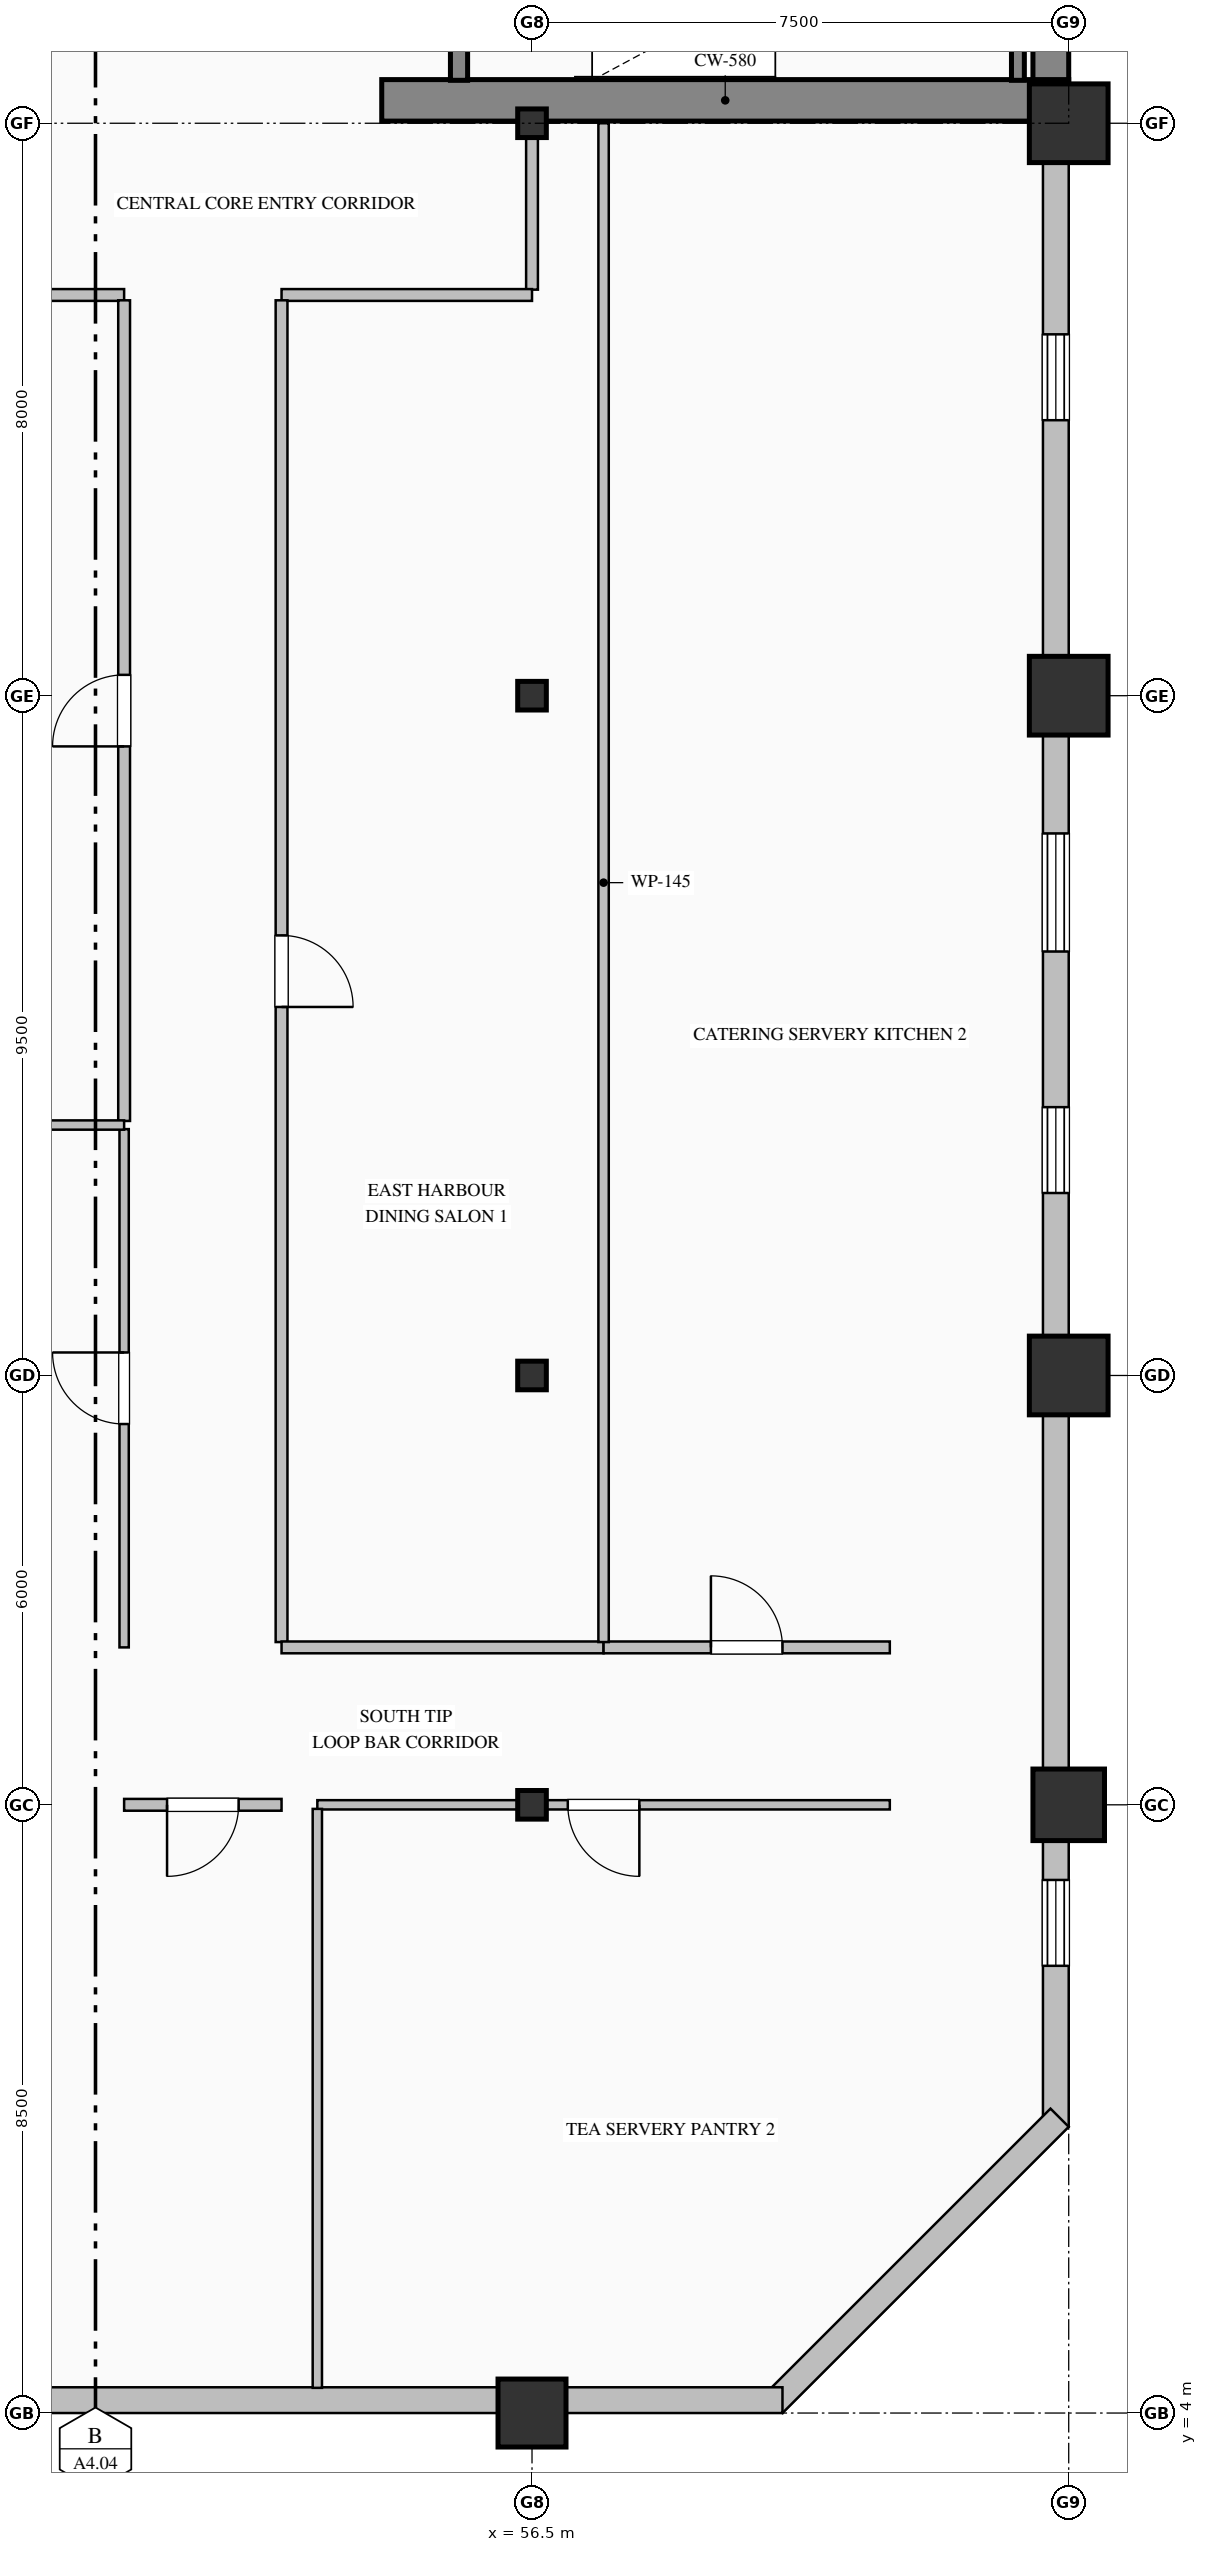
"""IFC4 building model, lengths in metres.
Left out: names, types, materials, properties, quantities, classifications, styles, units other than length and angle.
Written with IfcOpenShell. Run it as: python <this file> out.ifc"""

import sys

from ifc_helpers import new_model, si_unit, direction, frame, frame_2d, origin, origin_2d, place, context, subcontext, project, spatial, rectangle, hollow_rectangle, hollow_circle, i_section, extrude, element, fill, save


model = new_model("IFC4")
c1 = context("Model", 3, precision=1e-05, world=origin(), true_north=direction((0.0, 1.0)))
c2 = subcontext(c1, "Body", "Model", "MODEL_VIEW")
j1 = project(units=[si_unit("LENGTHUNIT", "METRE"), si_unit("PLANEANGLEUNIT", "RADIAN")], contexts=[c1])
p1 = place(None, origin())
s1 = spatial("IfcSite", under=j1, at=p1, CompositionType="ELEMENT")
p2 = place(p1, origin())
s2 = spatial("IfcBuilding", under=s1, at=p2, CompositionType="ELEMENT")
p3 = place(p2, frame((0.0, 0.0, 159.0)))
s3 = spatial("IfcBuildingStorey", under=s2, at=p3, CompositionType="ELEMENT", Elevation=159.0)
p4 = place(p3, frame((63.75, 36.32, 0.0), z_axis=(0.0, 0.0, 1.0), x_axis=(0.0, 1.0, 0.0)))
e1 = element("IfcWall", 1, at=p4, inside=s3, PredefinedType="SHEAR", context=c2, shape_type="SweptSolid", body=[
    extrude(rectangle(XDim=15.18, YDim=0.5, at=frame_2d((7.59, 0.0))), origin(), (0.0, 0.0, 1.0), 3.765),
])
p5 = place(p3, frame((54.4, 36.32, 0.0), z_axis=(0.0, 0.0, 1.0), x_axis=(1.0, 0.0, 0.0)))
e2 = element("IfcWall", 2, at=p5, inside=s3, PredefinedType="SHEAR", context=c2, shape_type="SweptSolid", body=[
    extrude(rectangle(XDim=9.6, YDim=0.58, at=frame_2d((4.8, 0.0))), origin(), (0.0, 0.0, 1.0), 4.0),
])
p6 = place(p3, frame((56.5, 4.0, 0.0), z_axis=(0.0, 0.0, 1.0), x_axis=(1.0, 0.0, 0.0)))
e3 = element("IfcColumn", 3, at=p6, inside=s3, PredefinedType="COLUMN", context=c2, shape_type="SweptSolid", body=[
    extrude(hollow_rectangle(XDim=0.95, YDim=0.95, WallThickness=0.036, at=origin_2d()), origin(), (0.0, 0.0, 1.0), 4.0),
])
for number, where, z_axis, x_axis in (
    (4, (56.5, 12.5, 0.0), (0.0, 0.0, 1.0), (1.0, 0.0, 0.0)),
    (5, (56.5, 18.5, 0.0), (0.0, 0.0, 1.0), (1.0, 0.0, 0.0)),
    (6, (56.5, 28.0, 0.0), (0.0, 0.0, 1.0), (1.0, 0.0, 0.0)),
    (7, (56.5, 36.0, 0.0), (0.0, 0.0, 1.0), (1.0, 0.0, 0.0)),
):
    element("IfcColumn", number, at=place(p3, frame(where, z_axis=z_axis, x_axis=x_axis)), inside=s3, PredefinedType="COLUMN", context=c2, shape_type="SweptSolid", body=[
        extrude(i_section(OverallWidth=0.4, OverallDepth=0.4, WebThickness=0.013, FlangeThickness=0.021, FilletRadius=0.022, at=origin_2d()), origin(), (0.0, 0.0, 1.0), 4.0),
    ])
p7 = place(p3, frame((64.0, 12.5, 0.0), z_axis=(0.0, 0.0, 1.0), x_axis=(1.0, 0.0, 0.0)))
e8 = element("IfcColumn", 8, at=p7, inside=s3, PredefinedType="COLUMN", context=c2, shape_type="SweptSolid", body=[
    extrude(hollow_circle(Radius=0.5, WallThickness=0.036, at=origin_2d()), origin(), (0.0, 0.0, 1.0), 4.0),
])
for number, where, z_axis, x_axis in (
    (9, (64.0, 18.5, 0.0), (0.0, 0.0, 1.0), (1.0, 0.0, 0.0)),
    (10, (64.0, 28.0, 0.0), (0.0, 0.0, 1.0), (1.0, 0.0, 0.0)),
    (11, (64.0, 36.0, 0.0), (0.0, 0.0, 1.0), (1.0, 0.0, 0.0)),
):
    element("IfcColumn", number, at=place(p3, frame(where, z_axis=z_axis, x_axis=x_axis)), inside=s3, PredefinedType="COLUMN", context=c2, shape_type="SweptSolid", body=[
        extrude(hollow_rectangle(XDim=1.1, YDim=1.1, WallThickness=0.04, at=origin_2d()), origin(), (0.0, 0.0, 1.0), 4.0),
    ])
p8 = place(p3, frame((63.82, 36.05, 0.0), z_axis=(0.0, 0.0, 1.0), x_axis=(0.0, -1.0, 0.0)))
e12 = element("IfcWall", 12, at=p8, inside=s3, PredefinedType="SOLIDWALL", context=c2, shape_type="SweptSolid", body=[
    extrude(rectangle(XDim=28.05, YDim=0.36, at=frame_2d((14.025, 0.0))), origin(), (0.0, 0.0, 1.0), 3.265),
])
p9 = place(p8, frame((3.0, 0.0, 0.7)))
e13 = element("IfcOpeningElement", 13, at=p9, cuts=e12, PredefinedType="OPENING", context=c2, shape_type="SweptSolid", body=[
    extrude(rectangle(XDim=1.2, YDim=1.85, at=frame_2d((0.6, 0.925))), frame((0.0, 0.19, 0.0), z_axis=(0.0, -1.0, 0.0), x_axis=(1.0, 0.0, 0.0)), (0.0, 0.0, 1.0), 0.38),
])
p10 = place(p8, frame((9.975, 0.0, 0.85)))
e14 = element("IfcOpeningElement", 14, at=p10, cuts=e12, PredefinedType="OPENING", context=c2, shape_type="SweptSolid", body=[
    extrude(rectangle(XDim=1.65, YDim=1.95, at=frame_2d((0.825, 0.975))), frame((0.0, 0.19, 0.0), z_axis=(0.0, -1.0, 0.0), x_axis=(1.0, 0.0, 0.0)), (0.0, 0.0, 1.0), 0.38),
])
p11 = place(p8, frame((13.8, 0.0, 0.7)))
e15 = element("IfcOpeningElement", 15, at=p11, cuts=e12, PredefinedType="OPENING", context=c2, shape_type="SweptSolid", body=[
    extrude(rectangle(XDim=1.2, YDim=1.85, at=frame_2d((0.6, 0.925))), frame((0.0, 0.19, 0.0), z_axis=(0.0, -1.0, 0.0), x_axis=(1.0, 0.0, 0.0)), (0.0, 0.0, 1.0), 0.38),
])
p12 = place(p8, frame((24.6, 0.0, 0.7)))
e16 = element("IfcOpeningElement", 16, at=p12, cuts=e12, PredefinedType="OPENING", context=c2, shape_type="SweptSolid", body=[
    extrude(rectangle(XDim=1.2, YDim=1.85, at=frame_2d((0.6, 0.925))), frame((0.0, 0.19, 0.0), z_axis=(0.0, -1.0, 0.0), x_axis=(1.0, 0.0, 0.0)), (0.0, 0.0, 1.0), 0.38),
])
p13 = place(p3, frame((63.873, 8.127, 0.0), z_axis=(0.0, 0.0, 1.0), x_axis=(-0.707106781187, -0.707106781187, 0.0)))
e17 = element("IfcWall", 17, at=p13, inside=s3, PredefinedType="SOLIDWALL", context=c2, shape_type="SweptSolid", body=[
    extrude(rectangle(XDim=5.657, YDim=0.36, at=frame_2d((2.828, 0.0))), origin(), (0.0, 0.0, 1.0), 3.765),
])
p14 = place(p3, frame((60.0, 4.18, 0.0), z_axis=(0.0, 0.0, 1.0), x_axis=(-1.0, 0.0, 0.0)))
e18 = element("IfcWall", 18, at=p14, inside=s3, PredefinedType="SOLIDWALL", context=c2, shape_type="SweptSolid", body=[
    extrude(rectangle(XDim=15.5, YDim=0.36, at=frame_2d((7.75, 0.0))), origin(), (0.0, 0.0, 1.0), 3.265),
])
p15 = place(p3, frame((55.48, 39.75, 0.0), z_axis=(0.0, 0.0, 1.0), x_axis=(0.0, -1.0, 0.0)))
e19 = element("IfcWall", 19, at=p15, inside=s3, PredefinedType="SOLIDWALL", context=c2, shape_type="SweptSolid", body=[
    extrude(rectangle(XDim=3.15, YDim=0.24, at=frame_2d((1.575, 0.0))), origin(), (0.0, 0.0, 1.0), 4.0),
])
p16 = place(p15, frame((1.0, 0.0, 0.0)))
e20 = element("IfcOpeningElement", 20, at=p16, cuts=e19, PredefinedType="OPENING", context=c2, shape_type="SweptSolid", body=[
    extrude(rectangle(XDim=1.15, YDim=2.2, at=frame_2d((0.575, 1.1))), frame((0.0, 0.13, 0.0), z_axis=(0.0, -1.0, 0.0), x_axis=(1.0, 0.0, 0.0)), (0.0, 0.0, 1.0), 0.26),
])
p17 = place(p3, frame((63.29, 36.6, 0.0), z_axis=(0.0, 0.0, 1.0), x_axis=(0.0, 1.0, 0.0)))
e21 = element("IfcWall", 21, at=p17, inside=s3, PredefinedType="SOLIDWALL", context=c2, shape_type="SweptSolid", body=[
    extrude(rectangle(XDim=3.15, YDim=0.18, at=frame_2d((1.575, 0.0))), origin(), (0.0, 0.0, 1.0), 4.0),
])
p18 = place(p3, frame((56.5, 36.0, 0.0), z_axis=(0.0, 0.0, 1.0), x_axis=(0.0, -1.0, 0.0)))
e22 = element("IfcWall", 22, at=p18, inside=s3, PredefinedType="PARTITIONING", context=c2, shape_type="SweptSolid", body=[
    extrude(rectangle(XDim=2.325, YDim=0.165, at=frame_2d((1.163, 0.0))), origin(), (0.0, 0.0, 1.0), 3.157),
])
p19 = place(p3, frame((56.5, 33.6, 0.0), z_axis=(0.0, 0.0, 1.0), x_axis=(-1.0, 0.0, 0.0)))
e23 = element("IfcWall", 23, at=p19, inside=s3, PredefinedType="PARTITIONING", context=c2, shape_type="SweptSolid", body=[
    extrude(rectangle(XDim=3.5, YDim=0.165, at=frame_2d((1.75, 0.0))), origin(), (0.0, 0.0, 1.0), 3.765),
])
p20 = place(p3, frame((50.8, 33.6, 0.0), z_axis=(0.0, 0.0, 1.0), x_axis=(-1.0, 0.0, 0.0)))
e24 = element("IfcWall", 24, at=p20, inside=s3, PredefinedType="PARTITIONING", context=c2, shape_type="SweptSolid", body=[
    extrude(rectangle(XDim=10.3, YDim=0.165, at=frame_2d((5.15, 0.0))), origin(), (0.0, 0.0, 1.0), 3.765),
])
p21 = place(p3, frame((53.0, 33.525, 0.0), z_axis=(0.0, 0.0, 1.0), x_axis=(0.0, -1.0, 0.0)))
e25 = element("IfcWall", 25, at=p21, inside=s3, PredefinedType="PARTITIONING", context=c2, shape_type="SweptSolid", body=[
    extrude(rectangle(XDim=18.751, YDim=0.165, at=frame_2d((9.375, 0.0))), origin(), (0.0, 0.0, 1.0), 3.765),
])
p22 = place(p21, frame((8.875, 0.0, 0.0)))
e26 = element("IfcOpeningElement", 26, at=p22, cuts=e25, PredefinedType="OPENING", context=c2, shape_type="SweptSolid", body=[
    extrude(rectangle(XDim=1.0, YDim=2.15, at=frame_2d((0.5, 1.075))), frame((0.0, 0.093, 0.0), z_axis=(0.0, -1.0, 0.0), x_axis=(1.0, 0.0, 0.0)), (0.0, 0.0, 1.0), 0.185),
])
p23 = place(p3, frame((50.8, 14.7, 0.0), z_axis=(0.0, 0.0, 1.0), x_axis=(0.0, 1.0, 0.0)))
e27 = element("IfcWall", 27, at=p23, inside=s3, PredefinedType="PARTITIONING", context=c2, shape_type="SweptSolid", body=[
    extrude(rectangle(XDim=7.243, YDim=0.13, at=frame_2d((3.622, 0.0))), origin(), (0.0, 0.0, 1.0), 3.765),
])
p24 = place(p23, frame((3.122, 0.0, 0.0)))
e28 = element("IfcOpeningElement", 28, at=p24, cuts=e27, PredefinedType="OPENING", context=c2, shape_type="SweptSolid", body=[
    extrude(rectangle(XDim=1.0, YDim=2.15, at=frame_2d((0.5, 1.075))), frame((0.0, 0.075, 0.0), z_axis=(0.0, -1.0, 0.0), x_axis=(1.0, 0.0, 0.0)), (0.0, 0.0, 1.0), 0.15),
])
p25 = place(p3, frame((50.8, 22.057, 0.0), z_axis=(0.0, 0.0, 1.0), x_axis=(0.0, 1.0, 0.0)))
e29 = element("IfcWall", 29, at=p25, inside=s3, PredefinedType="PARTITIONING", context=c2, shape_type="SweptSolid", body=[
    extrude(rectangle(XDim=11.469, YDim=0.165, at=frame_2d((5.734, 0.0))), origin(), (0.0, 0.0, 1.0), 3.765),
])
p26 = place(p25, frame((5.234, 0.0, 0.0)))
e30 = element("IfcOpeningElement", 30, at=p26, cuts=e29, PredefinedType="OPENING", context=c2, shape_type="SweptSolid", body=[
    extrude(rectangle(XDim=1.0, YDim=2.15, at=frame_2d((0.5, 1.075))), frame((0.0, 0.093, 0.0), z_axis=(0.0, -1.0, 0.0), x_axis=(1.0, 0.0, 0.0)), (0.0, 0.0, 1.0), 0.185),
])
p27 = place(p3, frame((53.0, 12.5, 0.0), z_axis=(0.0, 0.0, 1.0), x_axis=(-1.0, 0.0, 0.0)))
e31 = element("IfcWall", 31, at=p27, inside=s3, PredefinedType="PARTITIONING", context=c2, shape_type="SweptSolid", body=[
    extrude(rectangle(XDim=2.2, YDim=0.165, at=frame_2d((1.1, 0.0))), origin(), (0.0, 0.0, 1.0), 3.157),
])
p28 = place(p27, frame((0.6, 0.0, 0.0)))
e32 = element("IfcOpeningElement", 32, at=p28, cuts=e31, PredefinedType="OPENING", context=c2, shape_type="SweptSolid", body=[
    extrude(rectangle(XDim=1.0, YDim=2.15, at=frame_2d((0.5, 1.075))), frame((0.0, 0.093, 0.0), z_axis=(0.0, -1.0, 0.0), x_axis=(1.0, 0.0, 0.0)), (0.0, 0.0, 1.0), 0.185),
])
p29 = place(p3, frame((53.0, 14.7, 0.0), z_axis=(0.0, 0.0, 1.0), x_axis=(1.0, 0.0, 0.0)))
e33 = element("IfcWall", 33, at=p29, inside=s3, PredefinedType="PARTITIONING", context=c2, shape_type="SweptSolid", body=[
    extrude(rectangle(XDim=4.5, YDim=0.165, at=frame_2d((2.25, 0.0))), origin(), (0.0, 0.0, 1.0), 3.765),
])
p30 = place(p3, frame((57.5, 14.7, 0.0), z_axis=(0.0, 0.0, 1.0), x_axis=(1.0, 0.0, 0.0)))
e34 = element("IfcWall", 34, at=p30, inside=s3, PredefinedType="PARTITIONING", context=c2, shape_type="SweptSolid", body=[
    extrude(rectangle(XDim=4.0, YDim=0.165, at=frame_2d((2.0, 0.0))), origin(), (0.0, 0.0, 1.0), 3.765),
])
p31 = place(p30, frame((1.5, 0.0, 0.0)))
e35 = element("IfcOpeningElement", 35, at=p31, cuts=e34, PredefinedType="OPENING", context=c2, shape_type="SweptSolid", body=[
    extrude(rectangle(XDim=1.0, YDim=2.15, at=frame_2d((0.5, 1.075))), frame((0.0, 0.093, 0.0), z_axis=(0.0, -1.0, 0.0), x_axis=(1.0, 0.0, 0.0)), (0.0, 0.0, 1.0), 0.185),
])
p32 = place(p3, frame((61.5, 12.5, 0.0), z_axis=(0.0, 0.0, 1.0), x_axis=(-1.0, 0.0, 0.0)))
e36 = element("IfcWall", 36, at=p32, inside=s3, PredefinedType="PARTITIONING", context=c2, shape_type="SweptSolid", body=[
    extrude(rectangle(XDim=8.0, YDim=0.13, at=frame_2d((4.0, 0.0))), origin(), (0.0, 0.0, 1.0), 3.157),
])
p33 = place(p32, frame((3.5, 0.0, 0.0)))
e37 = element("IfcOpeningElement", 37, at=p33, cuts=e36, PredefinedType="OPENING", context=c2, shape_type="SweptSolid", body=[
    extrude(rectangle(XDim=1.0, YDim=2.15, at=frame_2d((0.5, 1.075))), frame((0.0, 0.075, 0.0), z_axis=(0.0, -1.0, 0.0), x_axis=(1.0, 0.0, 0.0)), (0.0, 0.0, 1.0), 0.15),
])
p34 = place(p3, frame((57.5, 36.0, 0.0), z_axis=(0.0, 0.0, 1.0), x_axis=(0.0, -1.0, 0.0)))
e38 = element("IfcWall", 38, at=p34, inside=s3, PredefinedType="PARTITIONING", context=c2, shape_type="SweptSolid", body=[
    extrude(rectangle(XDim=21.226, YDim=0.145, at=frame_2d((10.613, 0.0))), origin(), (0.0, 0.0, 1.0), 3.765),
])
p35 = place(p3, frame((40.852, 22.0, 0.0), z_axis=(0.0, 0.0, 1.0), x_axis=(1.0, 0.0, 0.0)))
e39 = element("IfcWall", 39, at=p35, inside=s3, PredefinedType="PARTITIONING", context=c2, shape_type="SweptSolid", body=[
    extrude(rectangle(XDim=9.948, YDim=0.13, at=frame_2d((4.974, 0.0))), origin(), (0.0, 0.0, 1.0), 3.765),
])
p36 = place(p3, frame((53.5, 12.443, 0.0), z_axis=(0.0, 0.0, 1.0), x_axis=(0.0, -1.0, 0.0)))
e40 = element("IfcWall", 40, at=p36, inside=s3, PredefinedType="PARTITIONING", context=c2, shape_type="SweptSolid", body=[
    extrude(rectangle(XDim=8.091, YDim=0.13, at=frame_2d((4.045, 0.0))), origin(), (0.0, 0.0, 1.0), 3.765),
])
p37 = place(p9, origin())
e41 = element("IfcWindow", 41, at=p37, inside=s3, PartitioningType="DOUBLE_PANEL_VERTICAL", PredefinedType="WINDOW", context=c2, shape_type="SweptSolid", body=[
    extrude(rectangle(XDim=1.2, YDim=1.85, at=frame_2d((0.6, 0.925))), frame((0.0, 0.15, 0.0), z_axis=(0.0, -1.0, 0.0), x_axis=(1.0, 0.0, 0.0)), (0.0, 0.0, 1.0), 0.06),
])
fill(e13, e41)
p38 = place(p10, origin())
e42 = element("IfcWindow", 42, at=p38, inside=s3, PartitioningType="DOUBLE_PANEL_VERTICAL", PredefinedType="WINDOW", context=c2, shape_type="SweptSolid", body=[
    extrude(rectangle(XDim=1.65, YDim=1.95, at=frame_2d((0.825, 0.975))), frame((0.0, 0.15, 0.0), z_axis=(0.0, -1.0, 0.0), x_axis=(1.0, 0.0, 0.0)), (0.0, 0.0, 1.0), 0.06),
])
fill(e14, e42)
p39 = place(p11, origin())
e43 = element("IfcWindow", 43, at=p39, inside=s3, PartitioningType="DOUBLE_PANEL_VERTICAL", PredefinedType="WINDOW", context=c2, shape_type="SweptSolid", body=[
    extrude(rectangle(XDim=1.2, YDim=1.85, at=frame_2d((0.6, 0.925))), frame((0.0, 0.15, 0.0), z_axis=(0.0, -1.0, 0.0), x_axis=(1.0, 0.0, 0.0)), (0.0, 0.0, 1.0), 0.06),
])
fill(e15, e43)
p40 = place(p12, origin())
e44 = element("IfcWindow", 44, at=p40, inside=s3, PartitioningType="DOUBLE_PANEL_VERTICAL", PredefinedType="WINDOW", context=c2, shape_type="SweptSolid", body=[
    extrude(rectangle(XDim=1.2, YDim=1.85, at=frame_2d((0.6, 0.925))), frame((0.0, 0.15, 0.0), z_axis=(0.0, -1.0, 0.0), x_axis=(1.0, 0.0, 0.0)), (0.0, 0.0, 1.0), 0.06),
])
fill(e16, e44)
p41 = place(p22, origin())
e45 = element("IfcDoor", 45, at=p41, inside=s3, OperationType="SINGLE_SWING_RIGHT", PredefinedType="DOOR", context=c2, shape_type="SweptSolid", body=[
    extrude(rectangle(XDim=1.0, YDim=2.15, at=frame_2d((0.5, 1.075))), frame((0.0, 0.025, 0.0), z_axis=(0.0, -1.0, 0.0), x_axis=(1.0, 0.0, 0.0)), (0.0, 0.0, 1.0), 0.05),
])
fill(e26, e45)
p42 = place(p31, origin())
e46 = element("IfcDoor", 46, at=p42, inside=s3, OperationType="SINGLE_SWING_LEFT", PredefinedType="DOOR", context=c2, shape_type="SweptSolid", body=[
    extrude(rectangle(XDim=1.0, YDim=2.15, at=frame_2d((0.5, 1.075))), frame((0.0, 0.025, 0.0), z_axis=(0.0, -1.0, 0.0), x_axis=(1.0, 0.0, 0.0)), (0.0, 0.0, 1.0), 0.05),
])
fill(e35, e46)
p43 = place(p24, origin())
e47 = element("IfcDoor", 47, at=p43, inside=s3, OperationType="SINGLE_SWING_RIGHT", PredefinedType="DOOR", context=c2, shape_type="SweptSolid", body=[
    extrude(rectangle(XDim=1.0, YDim=2.15, at=frame_2d((0.5, 1.075))), frame((0.0, 0.025, 0.0), z_axis=(0.0, -1.0, 0.0), x_axis=(1.0, 0.0, 0.0)), (0.0, 0.0, 1.0), 0.05),
])
fill(e28, e47)
p44 = place(p26, origin())
e48 = element("IfcDoor", 48, at=p44, inside=s3, OperationType="SINGLE_SWING_LEFT", PredefinedType="DOOR", context=c2, shape_type="SweptSolid", body=[
    extrude(rectangle(XDim=1.0, YDim=2.15, at=frame_2d((0.5, 1.075))), frame((0.0, 0.025, 0.0), z_axis=(0.0, -1.0, 0.0), x_axis=(1.0, 0.0, 0.0)), (0.0, 0.0, 1.0), 0.05),
])
fill(e30, e48)
p45 = place(p28, origin())
e49 = element("IfcDoor", 49, at=p45, inside=s3, OperationType="SINGLE_SWING_RIGHT", PredefinedType="DOOR", context=c2, shape_type="SweptSolid", body=[
    extrude(rectangle(XDim=1.0, YDim=2.15, at=frame_2d((0.5, 1.075))), frame((0.0, 0.025, 0.0), z_axis=(0.0, -1.0, 0.0), x_axis=(1.0, 0.0, 0.0)), (0.0, 0.0, 1.0), 0.05),
])
fill(e32, e49)
p46 = place(p33, origin())
e50 = element("IfcDoor", 50, at=p46, inside=s3, OperationType="SINGLE_SWING_LEFT", PredefinedType="DOOR", context=c2, shape_type="SweptSolid", body=[
    extrude(rectangle(XDim=1.0, YDim=2.15, at=frame_2d((0.5, 1.075))), frame((0.0, 0.025, 0.0), z_axis=(0.0, -1.0, 0.0), x_axis=(1.0, 0.0, 0.0)), (0.0, 0.0, 1.0), 0.05),
])
fill(e37, e50)
save(model, sys.argv[1])
